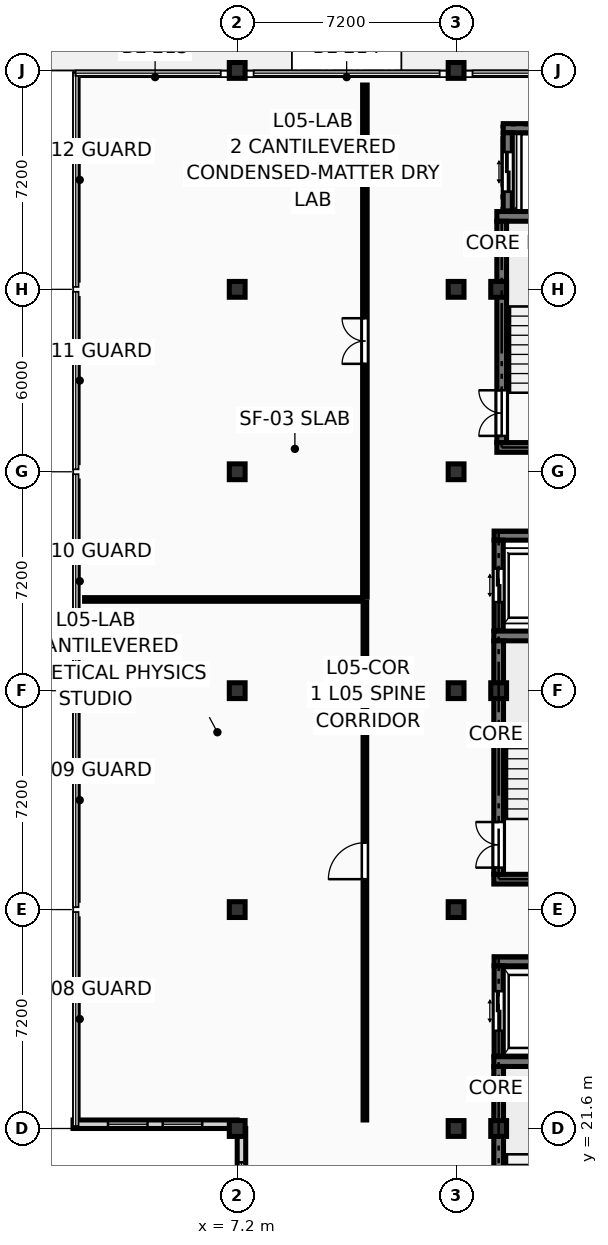
"""IFC4 building model, lengths in metres.
Left out: names, types, materials, properties, quantities, classifications, styles, units other than length and angle.
Written with IfcOpenShell. Run it as: python <this file> out.ifc"""

import sys

from ifc_helpers import new_model, si_unit, direction, frame, frame_2d, origin, origin_2d, place, context, subcontext, project, spatial, rectangle, extrude, element, fill, save


model = new_model("IFC4")
c1 = context("Model", 3, precision=1e-05, world=origin(), true_north=direction((0.0, 1.0)))
c2 = subcontext(c1, "Body", "Model", "MODEL_VIEW")
j1 = project(units=[si_unit("LENGTHUNIT", "METRE"), si_unit("PLANEANGLEUNIT", "RADIAN")], contexts=[c1])
p1 = place(None, origin())
s1 = spatial("IfcSite", under=j1, at=p1, CompositionType="ELEMENT")
p2 = place(p1, origin())
s2 = spatial("IfcBuilding", under=s1, at=p2, CompositionType="ELEMENT")
p3 = place(p2, frame((0.0, 0.0, 19.35)))
s3 = spatial("IfcBuildingStorey", under=s2, at=p3, CompositionType="ELEMENT", Elevation=19.35)
for number, where, z_axis, x_axis in (
    (1, (7.2, 21.6, 0.0), (0.0, 0.0, 1.0), (1.0, 0.0, 0.0)),
    (2, (7.2, 28.8, 0.0), (0.0, 0.0, 1.0), (1.0, 0.0, 0.0)),
    (3, (7.2, 36.0, 0.0), (0.0, 0.0, 1.0), (1.0, 0.0, 0.0)),
    (4, (7.2, 43.2, 0.0), (0.0, 0.0, 1.0), (1.0, 0.0, 0.0)),
    (5, (7.2, 49.2, 0.0), (0.0, 0.0, 1.0), (1.0, 0.0, 0.0)),
    (6, (7.2, 56.4, 0.0), (0.0, 0.0, 1.0), (1.0, 0.0, 0.0)),
    (7, (14.4, 21.6, 0.0), (0.0, 0.0, 1.0), (1.0, 0.0, 0.0)),
    (8, (14.4, 28.8, 0.0), (0.0, 0.0, 1.0), (1.0, 0.0, 0.0)),
    (9, (14.4, 36.0, 0.0), (0.0, 0.0, 1.0), (1.0, 0.0, 0.0)),
    (10, (14.4, 43.2, 0.0), (0.0, 0.0, 1.0), (1.0, 0.0, 0.0)),
    (11, (14.4, 49.2, 0.0), (0.0, 0.0, 1.0), (1.0, 0.0, 0.0)),
    (12, (14.4, 56.4, 0.0), (0.0, 0.0, 1.0), (1.0, 0.0, 0.0)),
    (13, (15.8, 21.6, 0.0), (0.0, 0.0, 1.0), (1.0, 0.0, 0.0)),
    (14, (15.8, 36.0, 0.0), (0.0, 0.0, 1.0), (1.0, 0.0, 0.0)),
    (15, (15.8, 49.2, 0.0), (0.0, 0.0, 1.0), (1.0, 0.0, 0.0)),
):
    element("IfcColumn", number, at=place(p3, frame(where, z_axis=z_axis, x_axis=x_axis)), inside=s3, PredefinedType="COLUMN", context=c2, shape_type="SweptSolid", body=[
        extrude(rectangle(XDim=0.52, YDim=0.52, at=origin_2d()), origin(), (0.0, 0.0, 1.0), 3.6),
    ])
p4 = place(p3, frame((7.34, 14.4, 0.0), z_axis=(0.0, 0.0, 1.0), x_axis=(0.0, 1.0, 0.0)))
e16 = element("IfcWall", 16, at=p4, inside=s3, PredefinedType="SOLIDWALL", context=c2, shape_type="SweptSolid", body=[
    extrude(rectangle(XDim=7.2, YDim=0.28, at=frame_2d((3.6, 0.0))), origin(), (0.0, 0.0, 1.0), 2.84),
])
p5 = place(p4, frame((1.113, 0.0, 0.18)))
e17 = element("IfcOpeningElement", 17, at=p5, cuts=e16, PredefinedType="OPENING", context=c2, shape_type="SweptSolid", body=[
    extrude(rectangle(XDim=1.35, YDim=2.45, at=frame_2d((0.675, 1.225))), frame((0.0, 0.152, 0.0), z_axis=(0.0, -1.0, 0.0), x_axis=(1.0, 0.0, 0.0)), (0.0, 0.0, 1.0), 0.304),
])
p6 = place(p4, frame((2.925, 0.0, 0.18)))
e18 = element("IfcOpeningElement", 18, at=p6, cuts=e16, PredefinedType="OPENING", context=c2, shape_type="SweptSolid", body=[
    extrude(rectangle(XDim=1.35, YDim=2.45, at=frame_2d((0.675, 1.225))), frame((0.0, 0.152, 0.0), z_axis=(0.0, -1.0, 0.0), x_axis=(1.0, 0.0, 0.0)), (0.0, 0.0, 1.0), 0.304),
])
p7 = place(p4, frame((4.738, 0.0, 0.18)))
e19 = element("IfcOpeningElement", 19, at=p7, cuts=e16, PredefinedType="OPENING", context=c2, shape_type="SweptSolid", body=[
    extrude(rectangle(XDim=1.35, YDim=2.45, at=frame_2d((0.675, 1.225))), frame((0.0, 0.152, 0.0), z_axis=(0.0, -1.0, 0.0), x_axis=(1.0, 0.0, 0.0)), (0.0, 0.0, 1.0), 0.304),
])
p8 = place(p3, frame((1.8, 21.74, 0.0), z_axis=(0.0, 0.0, 1.0), x_axis=(1.0, 0.0, 0.0)))
e20 = element("IfcWall", 20, at=p8, inside=s3, PredefinedType="SOLIDWALL", context=c2, shape_type="SweptSolid", body=[
    extrude(rectangle(XDim=5.4, YDim=0.28, at=frame_2d((2.7, 0.0))), origin(), (0.0, 0.0, 1.0), 2.696),
])
p9 = place(p8, frame((1.15, 0.0, 0.18)))
e21 = element("IfcOpeningElement", 21, at=p9, cuts=e20, PredefinedType="OPENING", context=c2, shape_type="SweptSolid", body=[
    extrude(rectangle(XDim=1.3, YDim=2.35, at=frame_2d((0.65, 1.175))), frame((0.0, 0.152, 0.0), z_axis=(0.0, -1.0, 0.0), x_axis=(1.0, 0.0, 0.0)), (0.0, 0.0, 1.0), 0.304),
])
p10 = place(p8, frame((2.95, 0.0, 0.18)))
e22 = element("IfcOpeningElement", 22, at=p10, cuts=e20, PredefinedType="OPENING", context=c2, shape_type="SweptSolid", body=[
    extrude(rectangle(XDim=1.3, YDim=2.35, at=frame_2d((0.65, 1.175))), frame((0.0, 0.152, 0.0), z_axis=(0.0, -1.0, 0.0), x_axis=(1.0, 0.0, 0.0)), (0.0, 0.0, 1.0), 0.304),
])
p11 = place(p3, frame((15.64, 23.8, 0.0), z_axis=(0.0, 0.0, 1.0), x_axis=(1.0, 0.0, 0.0)))
e23 = element("IfcWall", 23, at=p11, inside=s3, PredefinedType="SHEAR", context=c2, shape_type="SweptSolid", body=[
    extrude(rectangle(XDim=4.84, YDim=0.32, at=frame_2d((2.42, 0.0))), origin(), (0.0, 0.0, 1.0), 3.39),
])
p12 = place(p3, frame((15.8, 15.96, 0.0), z_axis=(0.0, 0.0, 1.0), x_axis=(0.0, 1.0, 0.0)))
e24 = element("IfcWall", 24, at=p12, inside=s3, PredefinedType="SHEAR", context=c2, shape_type="SweptSolid", body=[
    extrude(rectangle(XDim=7.68, YDim=0.32, at=frame_2d((3.84, 0.0))), origin(), (0.0, 0.0, 1.0), 3.39),
])
p13 = place(p12, frame((0.22, 0.0, 0.0)))
e25 = element("IfcOpeningElement", 25, at=p13, cuts=e24, PredefinedType="OPENING", context=c2, shape_type="SweptSolid", body=[
    extrude(rectangle(XDim=1.5, YDim=2.2, at=frame_2d((0.75, 1.1))), frame((0.0, 0.172, 0.0), z_axis=(0.0, -1.0, 0.0), x_axis=(1.0, 0.0, 0.0)), (0.0, 0.0, 1.0), 0.344),
])
for number, where, z_axis, x_axis in (
    (26, (15.64, 29.8, 0.0), (0.0, 0.0, 1.0), (1.0, 0.0, 0.0)),
    (27, (15.64, 37.8, 0.0), (0.0, 0.0, 1.0), (1.0, 0.0, 0.0)),
):
    element("IfcWall", number, at=place(p3, frame(where, z_axis=z_axis, x_axis=x_axis)), inside=s3, PredefinedType="SHEAR", context=c2, shape_type="SweptSolid", body=[
        extrude(rectangle(XDim=4.84, YDim=0.32, at=frame_2d((2.42, 0.0))), origin(), (0.0, 0.0, 1.0), 3.39),
    ])
p14 = place(p3, frame((15.8, 29.96, 0.0), z_axis=(0.0, 0.0, 1.0), x_axis=(0.0, 1.0, 0.0)))
e28 = element("IfcWall", 28, at=p14, inside=s3, PredefinedType="SHEAR", context=c2, shape_type="SweptSolid", body=[
    extrude(rectangle(XDim=7.68, YDim=0.32, at=frame_2d((3.84, 0.0))), origin(), (0.0, 0.0, 1.0), 3.39),
])
p15 = place(p14, frame((0.22, 0.0, 0.0)))
e29 = element("IfcOpeningElement", 29, at=p15, cuts=e28, PredefinedType="OPENING", context=c2, shape_type="SweptSolid", body=[
    extrude(rectangle(XDim=1.5, YDim=2.2, at=frame_2d((0.75, 1.1))), frame((0.0, 0.172, 0.0), z_axis=(0.0, -1.0, 0.0), x_axis=(1.0, 0.0, 0.0)), (0.0, 0.0, 1.0), 0.344),
])
for number, where, z_axis, x_axis in (
    (30, (15.74, 44.0, 0.0), (0.0, 0.0, 1.0), (1.0, 0.0, 0.0)),
    (31, (15.74, 51.6, 0.0), (0.0, 0.0, 1.0), (1.0, 0.0, 0.0)),
):
    element("IfcWall", number, at=place(p3, frame(where, z_axis=z_axis, x_axis=x_axis)), inside=s3, PredefinedType="SHEAR", context=c2, shape_type="SweptSolid", body=[
        extrude(rectangle(XDim=4.44, YDim=0.32, at=frame_2d((2.22, 0.0))), origin(), (0.0, 0.0, 1.0), 3.39),
    ])
p16 = place(p3, frame((15.9, 44.16, 0.0), z_axis=(0.0, 0.0, 1.0), x_axis=(0.0, 1.0, 0.0)))
e32 = element("IfcWall", 32, at=p16, inside=s3, PredefinedType="SHEAR", context=c2, shape_type="SweptSolid", body=[
    extrude(rectangle(XDim=7.28, YDim=0.32, at=frame_2d((3.64, 0.0))), origin(), (0.0, 0.0, 1.0), 3.39),
])
p17 = place(p16, frame((0.22, 0.0, 0.0)))
e33 = element("IfcOpeningElement", 33, at=p17, cuts=e32, PredefinedType="OPENING", context=c2, shape_type="SweptSolid", body=[
    extrude(rectangle(XDim=1.5, YDim=2.2, at=frame_2d((0.75, 1.1))), frame((0.0, 0.172, 0.0), z_axis=(0.0, -1.0, 0.0), x_axis=(1.0, 0.0, 0.0)), (0.0, 0.0, 1.0), 0.344),
])
p18 = place(p3, frame((15.65, 27.1, 0.0), z_axis=(0.0, 0.0, 1.0), x_axis=(1.0, 0.0, 0.0)))
e34 = element("IfcWall", 34, at=p18, inside=s3, PredefinedType="SHEAR", context=c2, shape_type="SweptSolid", body=[
    extrude(rectangle(XDim=2.56, YDim=0.3, at=frame_2d((1.28, 0.0))), origin(), (0.0, 0.0, 1.0), 3.39),
])
p19 = place(p3, frame((15.8, 23.98, 0.0), z_axis=(0.0, 0.0, 1.0), x_axis=(0.0, 1.0, 0.0)))
e35 = element("IfcWall", 35, at=p19, inside=s3, PredefinedType="SHEAR", context=c2, shape_type="SweptSolid", body=[
    extrude(rectangle(XDim=2.97, YDim=0.3, at=frame_2d((1.485, 0.0))), origin(), (0.0, 0.0, 1.0), 3.39),
])
p20 = place(p19, frame((0.835, 0.0, 0.0)))
e36 = element("IfcOpeningElement", 36, at=p20, cuts=e35, PredefinedType="OPENING", context=c2, shape_type="SweptSolid", body=[
    extrude(rectangle(XDim=1.3, YDim=2.25, at=frame_2d((0.65, 1.125))), frame((0.0, 0.162, 0.0), z_axis=(0.0, -1.0, 0.0), x_axis=(1.0, 0.0, 0.0)), (0.0, 0.0, 1.0), 0.324),
])
p21 = place(p3, frame((15.65, 41.1, 0.0), z_axis=(0.0, 0.0, 1.0), x_axis=(1.0, 0.0, 0.0)))
e37 = element("IfcWall", 37, at=p21, inside=s3, PredefinedType="SHEAR", context=c2, shape_type="SweptSolid", body=[
    extrude(rectangle(XDim=2.56, YDim=0.3, at=frame_2d((1.28, 0.0))), origin(), (0.0, 0.0, 1.0), 3.39),
])
p22 = place(p3, frame((15.8, 37.98, 0.0), z_axis=(0.0, 0.0, 1.0), x_axis=(0.0, 1.0, 0.0)))
e38 = element("IfcWall", 38, at=p22, inside=s3, PredefinedType="SHEAR", context=c2, shape_type="SweptSolid", body=[
    extrude(rectangle(XDim=2.97, YDim=0.3, at=frame_2d((1.485, 0.0))), origin(), (0.0, 0.0, 1.0), 3.39),
])
p23 = place(p22, frame((0.935, 0.0, 0.0)))
e39 = element("IfcOpeningElement", 39, at=p23, cuts=e38, PredefinedType="OPENING", context=c2, shape_type="SweptSolid", body=[
    extrude(rectangle(XDim=1.1, YDim=2.2, at=frame_2d((0.55, 1.1))), frame((0.0, 0.162, 0.0), z_axis=(0.0, -1.0, 0.0), x_axis=(1.0, 0.0, 0.0)), (0.0, 0.0, 1.0), 0.324),
])
p24 = place(p3, frame((15.95, 54.5, 0.0), z_axis=(0.0, 0.0, 1.0), x_axis=(1.0, 0.0, 0.0)))
e40 = element("IfcWall", 40, at=p24, inside=s3, PredefinedType="SHEAR", context=c2, shape_type="SweptSolid", body=[
    extrude(rectangle(XDim=3.0, YDim=0.3, at=frame_2d((1.5, 0.0))), origin(), (0.0, 0.0, 1.0), 3.39),
])
p25 = place(p3, frame((16.1, 51.78, 0.0), z_axis=(0.0, 0.0, 1.0), x_axis=(0.0, 1.0, 0.0)))
e41 = element("IfcWall", 41, at=p25, inside=s3, PredefinedType="SHEAR", context=c2, shape_type="SweptSolid", body=[
    extrude(rectangle(XDim=2.57, YDim=0.3, at=frame_2d((1.285, 0.0))), origin(), (0.0, 0.0, 1.0), 3.39),
])
p26 = place(p25, frame((0.635, 0.0, 0.0)))
e42 = element("IfcOpeningElement", 42, at=p26, cuts=e41, PredefinedType="OPENING", context=c2, shape_type="SweptSolid", body=[
    extrude(rectangle(XDim=1.3, YDim=2.25, at=frame_2d((0.65, 1.125))), frame((0.0, 0.162, 0.0), z_axis=(0.0, -1.0, 0.0), x_axis=(1.0, 0.0, 0.0)), (0.0, 0.0, 1.0), 0.324),
])
p27 = place(p3, frame((11.4, 21.88, 0.0), z_axis=(0.0, 0.0, 1.0), x_axis=(0.0, 1.0, 0.0)))
e43 = element("IfcWall", 43, at=p27, inside=s3, PredefinedType="PARTITIONING", context=c2, shape_type="SweptSolid", body=[
    extrude(rectangle(XDim=17.04, YDim=0.12, at=frame_2d((8.52, 0.0))), origin(), (0.0, 0.0, 1.0), 3.375),
])
p28 = place(p27, frame((7.92, 0.0, 0.0)))
e44 = element("IfcOpeningElement", 44, at=p28, cuts=e43, PredefinedType="OPENING", context=c2, shape_type="SweptSolid", body=[
    extrude(rectangle(XDim=1.2, YDim=2.15, at=frame_2d((0.6, 1.075))), frame((0.0, 0.072, 0.0), z_axis=(0.0, -1.0, 0.0), x_axis=(1.0, 0.0, 0.0)), (0.0, 0.0, 1.0), 0.144),
])
p29 = place(p3, frame((2.18, 39.0, 0.0), z_axis=(0.0, 0.0, 1.0), x_axis=(1.0, 0.0, 0.0)))
e45 = element("IfcWall", 45, at=p29, inside=s3, PredefinedType="PARTITIONING", context=c2, shape_type="SweptSolid", body=[
    extrude(rectangle(XDim=9.14, YDim=0.12, at=frame_2d((4.57, 0.0))), origin(), (0.0, 0.0, 1.0), 3.375),
])
p30 = place(p3, frame((11.4, 39.08, 0.0), z_axis=(0.0, 0.0, 1.0), x_axis=(0.0, 1.0, 0.0)))
e46 = element("IfcWall", 46, at=p30, inside=s3, PredefinedType="PARTITIONING", context=c2, shape_type="SweptSolid", body=[
    extrude(rectangle(XDim=16.84, YDim=0.15, at=frame_2d((8.42, 0.0))), origin(), (0.0, 0.0, 1.0), 3.375),
])
p31 = place(p30, frame((7.67, 0.0, 0.0)))
e47 = element("IfcOpeningElement", 47, at=p31, cuts=e46, PredefinedType="OPENING", context=c2, shape_type="SweptSolid", body=[
    extrude(rectangle(XDim=1.5, YDim=2.2, at=frame_2d((0.75, 1.1))), frame((0.0, 0.087, 0.0), z_axis=(0.0, -1.0, 0.0), x_axis=(1.0, 0.0, 0.0)), (0.0, 0.0, 1.0), 0.174),
])
p32 = place(p7, origin())
e48 = element("IfcWindow", 48, at=p32, inside=s3, PartitioningType="SINGLE_PANEL", PredefinedType="WINDOW", context=c2, shape_type="SweptSolid", body=[
    extrude(rectangle(XDim=1.35, YDim=2.45, at=frame_2d((0.675, 1.225))), frame((0.0, 0.03, 0.0), z_axis=(0.0, -1.0, 0.0), x_axis=(1.0, 0.0, 0.0)), (0.0, 0.0, 1.0), 0.06),
])
fill(e19, e48)
p33 = place(p9, origin())
e49 = element("IfcWindow", 49, at=p33, inside=s3, PartitioningType="SINGLE_PANEL", PredefinedType="WINDOW", context=c2, shape_type="SweptSolid", body=[
    extrude(rectangle(XDim=1.3, YDim=2.35, at=frame_2d((0.65, 1.175))), frame((0.0, 0.03, 0.0), z_axis=(0.0, -1.0, 0.0), x_axis=(1.0, 0.0, 0.0)), (0.0, 0.0, 1.0), 0.06),
])
fill(e21, e49)
p34 = place(p10, origin())
e50 = element("IfcWindow", 50, at=p34, inside=s3, PartitioningType="SINGLE_PANEL", PredefinedType="WINDOW", context=c2, shape_type="SweptSolid", body=[
    extrude(rectangle(XDim=1.3, YDim=2.35, at=frame_2d((0.65, 1.175))), frame((0.0, 0.03, 0.0), z_axis=(0.0, -1.0, 0.0), x_axis=(1.0, 0.0, 0.0)), (0.0, 0.0, 1.0), 0.06),
])
fill(e22, e50)
p35 = place(p15, origin())
e51 = element("IfcDoor", 51, at=p35, inside=s3, OperationType="DOUBLE_DOOR_SINGLE_SWING", PredefinedType="DOOR", context=c2, shape_type="SweptSolid", body=[
    extrude(rectangle(XDim=1.5, YDim=2.2, at=frame_2d((0.75, 1.1))), frame((0.0, 0.025, 0.0), z_axis=(0.0, -1.0, 0.0), x_axis=(1.0, 0.0, 0.0)), (0.0, 0.0, 1.0), 0.05),
])
fill(e29, e51)
p36 = place(p17, origin())
e52 = element("IfcDoor", 52, at=p36, inside=s3, OperationType="DOUBLE_DOOR_SINGLE_SWING", PredefinedType="DOOR", context=c2, shape_type="SweptSolid", body=[
    extrude(rectangle(XDim=1.5, YDim=2.2, at=frame_2d((0.75, 1.1))), frame((0.0, 0.025, 0.0), z_axis=(0.0, -1.0, 0.0), x_axis=(1.0, 0.0, 0.0)), (0.0, 0.0, 1.0), 0.05),
])
fill(e33, e52)
p37 = place(p20, origin())
e53 = element("IfcDoor", 53, at=p37, inside=s3, OperationType="DOUBLE_DOOR_SLIDING", PredefinedType="DOOR", context=c2, shape_type="SweptSolid", body=[
    extrude(rectangle(XDim=1.3, YDim=2.25, at=frame_2d((0.65, 1.125))), frame((0.0, 0.025, 0.0), z_axis=(0.0, -1.0, 0.0), x_axis=(1.0, 0.0, 0.0)), (0.0, 0.0, 1.0), 0.05),
])
fill(e36, e53)
p38 = place(p23, origin())
e54 = element("IfcDoor", 54, at=p38, inside=s3, OperationType="DOUBLE_DOOR_SLIDING", PredefinedType="DOOR", context=c2, shape_type="SweptSolid", body=[
    extrude(rectangle(XDim=1.1, YDim=2.2, at=frame_2d((0.55, 1.1))), frame((0.0, 0.025, 0.0), z_axis=(0.0, -1.0, 0.0), x_axis=(1.0, 0.0, 0.0)), (0.0, 0.0, 1.0), 0.05),
])
fill(e39, e54)
p39 = place(p26, origin())
e55 = element("IfcDoor", 55, at=p39, inside=s3, OperationType="DOUBLE_DOOR_SLIDING", PredefinedType="DOOR", context=c2, shape_type="SweptSolid", body=[
    extrude(rectangle(XDim=1.3, YDim=2.25, at=frame_2d((0.65, 1.125))), frame((0.0, 0.025, 0.0), z_axis=(0.0, -1.0, 0.0), x_axis=(1.0, 0.0, 0.0)), (0.0, 0.0, 1.0), 0.05),
])
fill(e42, e55)
p40 = place(p28, origin())
e56 = element("IfcDoor", 56, at=p40, inside=s3, OperationType="SINGLE_SWING_LEFT", PredefinedType="DOOR", context=c2, shape_type="SweptSolid", body=[
    extrude(rectangle(XDim=1.2, YDim=2.15, at=frame_2d((0.6, 1.075))), frame((0.0, 0.025, 0.0), z_axis=(0.0, -1.0, 0.0), x_axis=(1.0, 0.0, 0.0)), (0.0, 0.0, 1.0), 0.05),
])
fill(e44, e56)
p41 = place(p31, origin())
e57 = element("IfcDoor", 57, at=p41, inside=s3, OperationType="DOUBLE_DOOR_SINGLE_SWING", PredefinedType="DOOR", context=c2, shape_type="SweptSolid", body=[
    extrude(rectangle(XDim=1.5, YDim=2.2, at=frame_2d((0.75, 1.1))), frame((0.0, 0.025, 0.0), z_axis=(0.0, -1.0, 0.0), x_axis=(1.0, 0.0, 0.0)), (0.0, 0.0, 1.0), 0.05),
])
fill(e47, e57)
save(model, sys.argv[1])
